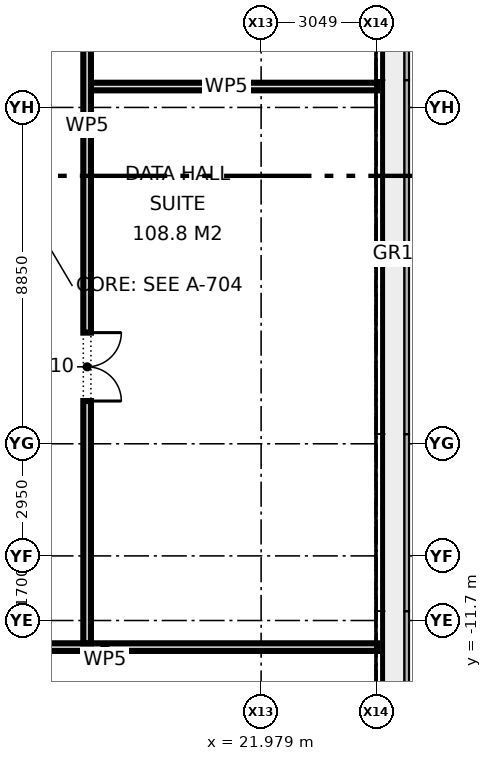
"""IFC4 building model, lengths in metres.
Left out: names, types, materials, properties, quantities, classifications, styles, units other than length and angle.
Written with IfcOpenShell. Run it as: python <this file> out.ifc"""

import sys

from ifc_helpers import new_model, si_unit, direction, frame, frame_2d, origin, place, context, subcontext, project, spatial, rectangle, extrude, element, fill, save


model = new_model("IFC4")
c1 = context("Model", 3, precision=1e-05, world=origin(), true_north=direction((0.0, 1.0)))
c2 = subcontext(c1, "Body", "Model", "MODEL_VIEW")
j1 = project(units=[si_unit("LENGTHUNIT", "METRE"), si_unit("PLANEANGLEUNIT", "RADIAN")], contexts=[c1])
p1 = place(None, origin())
s1 = spatial("IfcSite", under=j1, at=p1, CompositionType="ELEMENT")
p2 = place(p1, origin())
s2 = spatial("IfcBuilding", under=s1, at=p2, CompositionType="ELEMENT")
p3 = place(p2, frame((0.0, 0.0, 6.5)))
s3 = spatial("IfcBuildingStorey", under=s2, at=p3, CompositionType="ELEMENT", Elevation=6.5)
p4 = place(p3, frame((2.7, -12.4, 0.0), z_axis=(0.0, 0.0, 1.0), x_axis=(1.0, 0.0, 0.0)))
e1 = element("IfcWall", 1, at=p4, inside=s3, PredefinedType="PARTITIONING", context=c2, shape_type="SweptSolid", body=[
    extrude(rectangle(XDim=22.33, YDim=0.2, at=frame_2d((11.165, 0.0))), origin(), (0.0, 0.0, 1.0), 4.575),
])
p5 = place(p4, frame((6.805, 0.0, 0.0)))
e2 = element("IfcOpeningElement", 2, at=p5, cuts=e1, PredefinedType="OPENING", context=c2, shape_type="SweptSolid", body=[
    extrude(rectangle(XDim=1.2, YDim=2.1, at=frame_2d((0.6, 1.05))), frame((0.0, 0.11, 0.0), z_axis=(0.0, -1.0, 0.0), x_axis=(1.0, 0.0, 0.0)), (0.0, 0.0, 1.0), 0.22),
])
p6 = place(p3, frame((17.5, 2.35, 0.0), z_axis=(0.0, 0.0, 1.0), x_axis=(1.0, 0.0, 0.0)))
e3 = element("IfcWall", 3, at=p6, inside=s3, PredefinedType="PARTITIONING", context=c2, shape_type="SweptSolid", body=[
    extrude(rectangle(XDim=7.53, YDim=0.2, at=frame_2d((3.765, 0.0))), origin(), (0.0, 0.0, 1.0), 4.575),
])
p7 = place(p3, frame((17.4, -12.3, 0.0), z_axis=(0.0, 0.0, 1.0), x_axis=(0.0, 1.0, 0.0)))
e4 = element("IfcWall", 4, at=p7, inside=s3, PredefinedType="PARTITIONING", context=c2, shape_type="SweptSolid", body=[
    extrude(rectangle(XDim=24.6, YDim=0.2, at=frame_2d((12.3, 0.0))), origin(), (0.0, 0.0, 1.0), 4.575),
])
p8 = place(p7, frame((6.375, 0.0, 0.0)))
e5 = element("IfcOpeningElement", 5, at=p8, cuts=e4, PredefinedType="OPENING", context=c2, shape_type="SweptSolid", body=[
    extrude(rectangle(XDim=1.8, YDim=2.1, at=frame_2d((0.9, 1.05))), frame((0.0, 0.11, 0.0), z_axis=(0.0, -1.0, 0.0), x_axis=(1.0, 0.0, 0.0)), (0.0, 0.0, 1.0), 0.22),
])
p9 = place(p7, frame((19.075, 0.0, 0.0)))
e6 = element("IfcOpeningElement", 6, at=p9, cuts=e4, PredefinedType="OPENING", context=c2, shape_type="SweptSolid", body=[
    extrude(rectangle(XDim=1.2, YDim=2.1, at=frame_2d((0.6, 1.05))), frame((0.0, 0.11, 0.0), z_axis=(0.0, -1.0, 0.0), x_axis=(1.0, 0.0, 0.0)), (0.0, 0.0, 1.0), 0.22),
])
p10 = place(p8, frame((1.8, 0.0, 0.0), z_axis=(0.0, 0.0, 1.0), x_axis=(-1.0, 0.0, 0.0)))
e7 = element("IfcDoor", 7, at=p10, inside=s3, OperationType="DOUBLE_DOOR_SINGLE_SWING", PredefinedType="DOOR", context=c2, shape_type="SweptSolid", body=[
    extrude(rectangle(XDim=1.8, YDim=2.1, at=frame_2d((0.9, 1.05))), frame((0.0, 0.025, 0.0), z_axis=(0.0, -1.0, 0.0), x_axis=(1.0, 0.0, 0.0)), (0.0, 0.0, 1.0), 0.05),
])
fill(e5, e7)
save(model, sys.argv[1])
